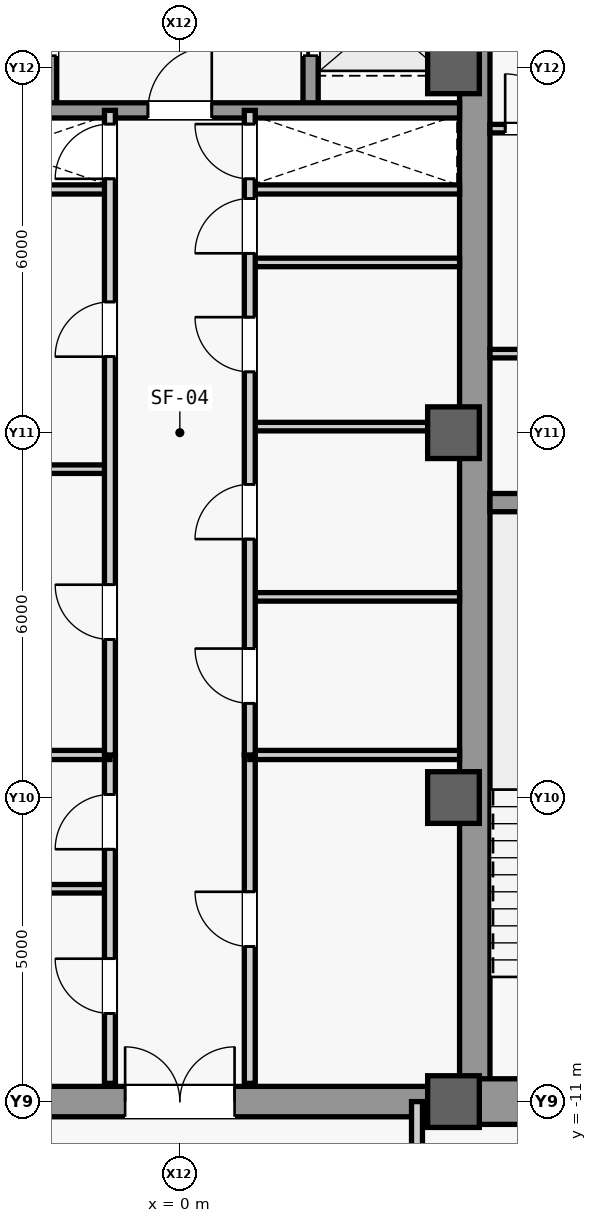
"""IFC4 building model, lengths in metres.
Left out: names, types, materials, properties, quantities, classifications, styles, units other than length and angle.
Written with IfcOpenShell. Run it as: python <this file> out.ifc"""

import sys

from ifc_helpers import new_model, si_unit, direction, frame, frame_2d, origin, origin_2d, place, context, subcontext, project, spatial, rectangle, extrude, source, transform, mapped, element, fill, save


model = new_model("IFC4")
c1 = context("Model", 3, precision=1e-05, world=origin(), true_north=direction((0.0, 1.0)))
c2 = subcontext(c1, "Body", "Model", "MODEL_VIEW")
j1 = project(units=[si_unit("LENGTHUNIT", "METRE"), si_unit("PLANEANGLEUNIT", "RADIAN")], contexts=[c1])
p1 = place(None, origin())
s1 = spatial("IfcSite", under=j1, at=p1, CompositionType="ELEMENT")
p2 = place(p1, origin())
s2 = spatial("IfcBuilding", under=s1, at=p2, CompositionType="ELEMENT")
p3 = place(p2, frame((0.0, 0.0, 203.1)))
s3 = spatial("IfcBuildingStorey", under=s2, at=p3, CompositionType="ELEMENT", Elevation=203.1)
m1 = source(origin(), c2, "Body", "SweptSolid", [
    extrude(rectangle(XDim=21.4, YDim=0.5, at=frame_2d((10.7, 0.0))), origin(), (0.0, 0.0, 1.0), 3.78),
])
p4 = place(p3, frame((4.85, -10.7, 0.0), z_axis=(0.0, 0.0, 1.0), x_axis=(0.0, 1.0, 0.0)))
e1 = element("IfcWall", 1, at=p4, inside=s3, PredefinedType="SHEAR", context=c2, shape_type="MappedRepresentation", body=[
    mapped(m1, transform((0.0, 0.0, 0.0), scale=1.0)),
])
m2 = source(origin(), c2, "Body", "SweptSolid", [
    extrude(rectangle(XDim=5.85, YDim=0.75, at=frame_2d((2.925, 0.0))), origin(), (0.0, 0.0, 1.0), 3.78),
])
p5 = place(p3, frame((4.85, -11.0, 0.0), z_axis=(0.0, 0.0, 1.0), x_axis=(1.0, 0.0, 0.0)))
e2 = element("IfcWall", 2, at=p5, inside=s3, PredefinedType="SHEAR", context=c2, shape_type="MappedRepresentation", body=[
    mapped(m2, transform((0.0, 0.0, 0.0), scale=1.0)),
])
m3 = source(origin(), c2, "Body", "SweptSolid", [
    extrude(rectangle(XDim=5.6, YDim=0.3, at=frame_2d((2.8, 0.0))), origin(), (0.0, 0.0, 1.0), 3.78),
])
p6 = place(p3, frame((5.1, -1.15, 0.0), z_axis=(0.0, 0.0, 1.0), x_axis=(1.0, 0.0, 0.0)))
e3 = element("IfcWall", 3, at=p6, inside=s3, PredefinedType="SHEAR", context=c2, shape_type="MappedRepresentation", body=[
    mapped(m3, transform((0.0, 0.0, 0.0), scale=1.0)),
])
m4 = source(origin(), c2, "Body", "SweptSolid", [
    extrude(rectangle(XDim=9.2, YDim=0.5, at=frame_2d((4.6, 0.0))), origin(), (0.0, 0.0, 1.0), 3.78),
])
p7 = place(p3, frame((-4.6, -11.0, 0.0), z_axis=(0.0, 0.0, 1.0), x_axis=(1.0, 0.0, 0.0)))
e4 = element("IfcWall", 4, at=p7, inside=s3, PredefinedType="SHEAR", context=c2, shape_type="MappedRepresentation", body=[
    mapped(m4, transform((0.0, 0.0, 0.0), scale=1.0)),
])
m5 = source(origin(), c2, "Body", "SweptSolid", [
    extrude(rectangle(XDim=1.8, YDim=2.25, at=frame_2d((0.9, 1.125))), frame((0.0, 0.26, 0.0), z_axis=(0.0, -1.0, 0.0), x_axis=(1.0, 0.0, 0.0)), (0.0, 0.0, 1.0), 0.52),
])
p8 = place(p7, frame((3.7, 0.0, 0.0)))
e5 = element("IfcOpeningElement", 5, at=p8, cuts=e4, PredefinedType="OPENING", context=c2, shape_type="MappedRepresentation", body=[
    mapped(m5, transform((0.0, 0.0, 0.0), scale=1.0)),
])
m6 = source(origin(), c2, "Body", "SweptSolid", [
    extrude(rectangle(XDim=0.85, YDim=0.85, at=origin_2d()), origin(), (0.0, 0.0, 1.0), 4.0),
])
for number, where, z_axis, x_axis in (
    (6, (4.5, -11.0, 0.0), (0.0, 0.0, 1.0), (1.0, 0.0, 0.0)),
    (7, (4.5, -6.0, 0.0), (0.0, 0.0, 1.0), (1.0, 0.0, 0.0)),
    (8, (4.5, 0.0, 0.0), (0.0, 0.0, 1.0), (1.0, 0.0, 0.0)),
    (9, (4.5, 6.0, 0.0), (0.0, 0.0, 1.0), (1.0, 0.0, 0.0)),
):
    element("IfcColumn", number, at=place(p3, frame(where, z_axis=z_axis, x_axis=x_axis)), inside=s3, PredefinedType="COLUMN", context=c2, shape_type="MappedRepresentation", body=[
        mapped(m6, transform((0.0, 0.0, 0.0), scale=1.0)),
    ])
m7 = source(origin(), c2, "Body", "SweptSolid", [
    extrude(rectangle(XDim=3.15, YDim=0.14, at=frame_2d((1.575, 0.0))), origin(), (0.0, 0.0, 1.0), 3.78),
])
p9 = place(p3, frame((5.1, 1.3, 0.0), z_axis=(0.0, 0.0, 1.0), x_axis=(1.0, 0.0, 0.0)))
e10 = element("IfcWall", 10, at=p9, inside=s3, PredefinedType="PARTITIONING", context=c2, shape_type="MappedRepresentation", body=[
    mapped(m7, transform((0.0, 0.0, 0.0), scale=1.0)),
])
p10 = place(p3, frame((5.1, 5.0, 0.0), z_axis=(0.0, 0.0, 1.0), x_axis=(1.0, 0.0, 0.0)))
e11 = element("IfcWall", 11, at=p10, inside=s3, PredefinedType="PARTITIONING", context=c2, shape_type="MappedRepresentation", body=[
    mapped(m7, transform((0.0, 0.0, 0.0), scale=1.0)),
])
m8 = source(origin(), c2, "Body", "SweptSolid", [
    extrude(rectangle(XDim=0.9, YDim=2.15, at=frame_2d((0.45, 1.075))), frame((0.0, 0.08, 0.0), z_axis=(0.0, -1.0, 0.0), x_axis=(1.0, 0.0, 0.0)), (0.0, 0.0, 1.0), 0.16),
])
p11 = place(p10, frame((0.25, 0.0, 0.0)))
e12 = element("IfcOpeningElement", 12, at=p11, cuts=e11, PredefinedType="OPENING", context=c2, shape_type="MappedRepresentation", body=[
    mapped(m8, transform((0.0, 0.0, 0.0), scale=1.0)),
])
m9 = source(origin(), c2, "Body", "SweptSolid", [
    extrude(rectangle(XDim=3.45, YDim=0.15, at=frame_2d((1.725, 0.0))), origin(), (0.0, 0.0, 1.0), 3.78),
])
for number, where, z_axis, x_axis in (
    (13, (-4.6, 4.0, 0.0), (0.0, 0.0, 1.0), (1.0, 0.0, 0.0)),
    (14, (1.15, 4.0, 0.0), (0.0, 0.0, 1.0), (1.0, 0.0, 0.0)),
):
    element("IfcWall", number, at=place(p3, frame(where, z_axis=z_axis, x_axis=x_axis)), inside=s3, PredefinedType="PARTITIONING", context=c2, shape_type="MappedRepresentation", body=[
        mapped(m9, transform((0.0, 0.0, 0.0), scale=1.0)),
    ])
m10 = source(origin(), c2, "Body", "SweptSolid", [
    extrude(rectangle(XDim=3.45, YDim=0.14, at=frame_2d((1.725, 0.0))), origin(), (0.0, 0.0, 1.0), 3.78),
])
p12 = place(p3, frame((-4.6, -7.5, 0.0), z_axis=(0.0, 0.0, 1.0), x_axis=(1.0, 0.0, 0.0)))
e15 = element("IfcWall", 15, at=p12, inside=s3, PredefinedType="PARTITIONING", context=c2, shape_type="MappedRepresentation", body=[
    mapped(m10, transform((0.0, 0.0, 0.0), scale=1.0)),
])
m11 = source(origin(), c2, "Body", "SweptSolid", [
    extrude(rectangle(XDim=5.4, YDim=0.18, at=frame_2d((2.7, 0.0))), origin(), (0.0, 0.0, 1.0), 3.78),
])
p13 = place(p3, frame((-1.15, -10.7, 0.0), z_axis=(0.0, 0.0, 1.0), x_axis=(0.0, 1.0, 0.0)))
e16 = element("IfcWall", 16, at=p13, inside=s3, PredefinedType="PARTITIONING", context=c2, shape_type="MappedRepresentation", body=[
    mapped(m11, transform((0.0, 0.0, 0.0), scale=1.0)),
])
m12 = source(origin(), c2, "Body", "SweptSolid", [
    extrude(rectangle(XDim=0.9, YDim=2.15, at=frame_2d((0.45, 1.075))), frame((0.0, 0.1, 0.0), z_axis=(0.0, -1.0, 0.0), x_axis=(1.0, 0.0, 0.0)), (0.0, 0.0, 1.0), 0.2),
])
p14 = place(p13, frame((1.15, 0.0, 0.0)))
e17 = element("IfcOpeningElement", 17, at=p14, cuts=e16, PredefinedType="OPENING", context=c2, shape_type="MappedRepresentation", body=[
    mapped(m12, transform((0.0, 0.0, 0.0), scale=1.0)),
])
p15 = place(p13, frame((3.85, 0.0, 0.0)))
e18 = element("IfcOpeningElement", 18, at=p15, cuts=e16, PredefinedType="OPENING", context=c2, shape_type="MappedRepresentation", body=[
    mapped(m12, transform((0.0, 0.0, 0.0), scale=1.0)),
])
p16 = place(p3, frame((1.15, -10.7, 0.0), z_axis=(0.0, 0.0, 1.0), x_axis=(0.0, 1.0, 0.0)))
e19 = element("IfcWall", 19, at=p16, inside=s3, PredefinedType="PARTITIONING", context=c2, shape_type="MappedRepresentation", body=[
    mapped(m11, transform((0.0, 0.0, 0.0), scale=1.0)),
])
p17 = place(p16, frame((2.25, 0.0, 0.0)))
e20 = element("IfcOpeningElement", 20, at=p17, cuts=e19, PredefinedType="OPENING", context=c2, shape_type="MappedRepresentation", body=[
    mapped(m12, transform((0.0, 0.0, 0.0), scale=1.0)),
])
for number, where, z_axis, x_axis in (
    (21, (-4.6, -5.3, 0.0), (0.0, 0.0, 1.0), (1.0, 0.0, 0.0)),
    (22, (1.15, -5.3, 0.0), (0.0, 0.0, 1.0), (1.0, 0.0, 0.0)),
):
    element("IfcWall", number, at=place(p3, frame(where, z_axis=z_axis, x_axis=x_axis)), inside=s3, PredefinedType="PARTITIONING", context=c2, shape_type="MappedRepresentation", body=[
        mapped(m9, transform((0.0, 0.0, 0.0), scale=1.0)),
    ])
m13 = source(origin(), c2, "Body", "SweptSolid", [
    extrude(rectangle(XDim=5.4, YDim=0.25, at=frame_2d((2.7, 0.0))), origin(), (0.0, 0.0, 1.0), 3.78),
])
p18 = place(p3, frame((-2.15, 5.3, 0.0), z_axis=(0.0, 0.0, 1.0), x_axis=(0.0, 1.0, 0.0)))
e23 = element("IfcWall", 23, at=p18, inside=s3, PredefinedType="SHEAR", context=c2, shape_type="MappedRepresentation", body=[
    mapped(m13, transform((0.0, 0.0, 0.0), scale=1.0)),
])
m14 = source(origin(), c2, "Body", "SweptSolid", [
    extrude(rectangle(XDim=1.2, YDim=2.3, at=frame_2d((0.6, 1.15))), frame((0.0, 0.135, 0.0), z_axis=(0.0, -1.0, 0.0), x_axis=(1.0, 0.0, 0.0)), (0.0, 0.0, 1.0), 0.27),
])
p19 = place(p18, frame((3.3, 0.0, 0.0)))
e24 = element("IfcOpeningElement", 24, at=p19, cuts=e23, PredefinedType="OPENING", context=c2, shape_type="MappedRepresentation", body=[
    mapped(m14, transform((0.0, 0.0, 0.0), scale=1.0)),
])
p20 = place(p18, frame((0.9, 0.0, 0.0)))
e25 = element("IfcOpeningElement", 25, at=p20, cuts=e23, PredefinedType="OPENING", context=c2, shape_type="MappedRepresentation", body=[
    mapped(m14, transform((0.0, 0.0, 0.0), scale=1.0)),
])
p21 = place(p3, frame((2.15, 5.3, 0.0), z_axis=(0.0, 0.0, 1.0), x_axis=(0.0, 1.0, 0.0)))
e26 = element("IfcWall", 26, at=p21, inside=s3, PredefinedType="SHEAR", context=c2, shape_type="MappedRepresentation", body=[
    mapped(m13, transform((0.0, 0.0, 0.0), scale=1.0)),
])
p22 = place(p21, frame((3.3, 0.0, 0.0)))
e27 = element("IfcOpeningElement", 27, at=p22, cuts=e26, PredefinedType="OPENING", context=c2, shape_type="MappedRepresentation", body=[
    mapped(m14, transform((0.0, 0.0, 0.0), scale=1.0)),
])
p23 = place(p21, frame((0.9, 0.0, 0.0)))
e28 = element("IfcOpeningElement", 28, at=p23, cuts=e26, PredefinedType="OPENING", context=c2, shape_type="MappedRepresentation", body=[
    mapped(m14, transform((0.0, 0.0, 0.0), scale=1.0)),
])
m15 = source(origin(), c2, "Body", "SweptSolid", [
    extrude(rectangle(XDim=9.2, YDim=0.25, at=frame_2d((4.6, 0.0))), origin(), (0.0, 0.0, 1.0), 3.78),
])
p24 = place(p3, frame((-4.6, 5.3, 0.0), z_axis=(0.0, 0.0, 1.0), x_axis=(1.0, 0.0, 0.0)))
e29 = element("IfcWall", 29, at=p24, inside=s3, PredefinedType="SHEAR", context=c2, shape_type="MappedRepresentation", body=[
    mapped(m15, transform((0.0, 0.0, 0.0), scale=1.0)),
])
m16 = source(origin(), c2, "Body", "SweptSolid", [
    extrude(rectangle(XDim=1.05, YDim=2.2, at=frame_2d((0.525, 1.1))), frame((0.0, 0.135, 0.0), z_axis=(0.0, -1.0, 0.0), x_axis=(1.0, 0.0, 0.0)), (0.0, 0.0, 1.0), 0.27),
])
p25 = place(p24, frame((4.075, 0.0, 0.0)))
e30 = element("IfcOpeningElement", 30, at=p25, cuts=e29, PredefinedType="OPENING", context=c2, shape_type="MappedRepresentation", body=[
    mapped(m16, transform((0.0, 0.0, 0.0), scale=1.0)),
])
p26 = place(p3, frame((-4.6, -0.6, 0.0), z_axis=(0.0, 0.0, 1.0), x_axis=(1.0, 0.0, 0.0)))
e31 = element("IfcWall", 31, at=p26, inside=s3, PredefinedType="PARTITIONING", context=c2, shape_type="MappedRepresentation", body=[
    mapped(m10, transform((0.0, 0.0, 0.0), scale=1.0)),
])
m17 = source(origin(), c2, "Body", "SweptSolid", [
    extrude(rectangle(XDim=10.6, YDim=0.18, at=frame_2d((5.3, 0.0))), origin(), (0.0, 0.0, 1.0), 3.78),
])
p27 = place(p3, frame((-1.15, -5.3, 0.0), z_axis=(0.0, 0.0, 1.0), x_axis=(0.0, 1.0, 0.0)))
e32 = element("IfcWall", 32, at=p27, inside=s3, PredefinedType="PARTITIONING", context=c2, shape_type="MappedRepresentation", body=[
    mapped(m17, transform((0.0, 0.0, 0.0), scale=1.0)),
])
p28 = place(p27, frame((1.9, 0.0, 0.0)))
e33 = element("IfcOpeningElement", 33, at=p28, cuts=e32, PredefinedType="OPENING", context=c2, shape_type="MappedRepresentation", body=[
    mapped(m12, transform((0.0, 0.0, 0.0), scale=1.0)),
])
p29 = place(p27, frame((6.55, 0.0, 0.0)))
e34 = element("IfcOpeningElement", 34, at=p29, cuts=e32, PredefinedType="OPENING", context=c2, shape_type="MappedRepresentation", body=[
    mapped(m12, transform((0.0, 0.0, 0.0), scale=1.0)),
])
p30 = place(p27, frame((9.475, 0.0, 0.0)))
e35 = element("IfcOpeningElement", 35, at=p30, cuts=e32, PredefinedType="OPENING", context=c2, shape_type="MappedRepresentation", body=[
    mapped(m12, transform((0.0, 0.0, 0.0), scale=1.0)),
])
p31 = place(p3, frame((1.15, -2.7, 0.0), z_axis=(0.0, 0.0, 1.0), x_axis=(1.0, 0.0, 0.0)))
e36 = element("IfcWall", 36, at=p31, inside=s3, PredefinedType="PARTITIONING", context=c2, shape_type="MappedRepresentation", body=[
    mapped(m10, transform((0.0, 0.0, 0.0), scale=1.0)),
])
m18 = source(origin(), c2, "Body", "SweptSolid", [
    extrude(rectangle(XDim=3.45, YDim=0.14, at=frame_2d((1.725, 0.0))), origin(), (0.0, 0.0, 1.0), 3.085),
])
p32 = place(p3, frame((1.15, 0.1, 0.0), z_axis=(0.0, 0.0, 1.0), x_axis=(1.0, 0.0, 0.0)))
e37 = element("IfcWall", 37, at=p32, inside=s3, PredefinedType="PARTITIONING", context=c2, shape_type="MappedRepresentation", body=[
    mapped(m18, transform((0.0, 0.0, 0.0), scale=1.0)),
])
p33 = place(p3, frame((1.15, 2.8, 0.0), z_axis=(0.0, 0.0, 1.0), x_axis=(1.0, 0.0, 0.0)))
e38 = element("IfcWall", 38, at=p33, inside=s3, PredefinedType="PARTITIONING", context=c2, shape_type="MappedRepresentation", body=[
    mapped(m10, transform((0.0, 0.0, 0.0), scale=1.0)),
])
p34 = place(p3, frame((1.15, -5.3, 0.0), z_axis=(0.0, 0.0, 1.0), x_axis=(0.0, 1.0, 0.0)))
e39 = element("IfcWall", 39, at=p34, inside=s3, PredefinedType="PARTITIONING", context=c2, shape_type="MappedRepresentation", body=[
    mapped(m17, transform((0.0, 0.0, 0.0), scale=1.0)),
])
p35 = place(p34, frame((0.85, 0.0, 0.0)))
e40 = element("IfcOpeningElement", 40, at=p35, cuts=e39, PredefinedType="OPENING", context=c2, shape_type="MappedRepresentation", body=[
    mapped(m12, transform((0.0, 0.0, 0.0), scale=1.0)),
])
p36 = place(p34, frame((3.55, 0.0, 0.0)))
e41 = element("IfcOpeningElement", 41, at=p36, cuts=e39, PredefinedType="OPENING", context=c2, shape_type="MappedRepresentation", body=[
    mapped(m12, transform((0.0, 0.0, 0.0), scale=1.0)),
])
p37 = place(p34, frame((6.3, 0.0, 0.0)))
e42 = element("IfcOpeningElement", 42, at=p37, cuts=e39, PredefinedType="OPENING", context=c2, shape_type="MappedRepresentation", body=[
    mapped(m12, transform((0.0, 0.0, 0.0), scale=1.0)),
])
p38 = place(p34, frame((8.25, 0.0, 0.0)))
e43 = element("IfcOpeningElement", 43, at=p38, cuts=e39, PredefinedType="OPENING", context=c2, shape_type="MappedRepresentation", body=[
    mapped(m12, transform((0.0, 0.0, 0.0), scale=1.0)),
])
p39 = place(p34, frame((9.475, 0.0, 0.0)))
e44 = element("IfcOpeningElement", 44, at=p39, cuts=e39, PredefinedType="OPENING", context=c2, shape_type="MappedRepresentation", body=[
    mapped(m12, transform((0.0, 0.0, 0.0), scale=1.0)),
])
m19 = source(origin(), c2, "Body", "SweptSolid", [
    extrude(rectangle(XDim=2.6, YDim=0.18, at=frame_2d((1.3, 0.0))), origin(), (0.0, 0.0, 1.0), 3.78),
])
p40 = place(p3, frame((3.9, -13.6, 0.0), z_axis=(0.0, 0.0, 1.0), x_axis=(0.0, 1.0, 0.0)))
e45 = element("IfcWall", 45, at=p40, inside=s3, PredefinedType="PARTITIONING", context=c2, shape_type="MappedRepresentation", body=[
    mapped(m19, transform((0.0, 0.0, 0.0), scale=1.0)),
])
m20 = source(origin(), c2, "Body", "SweptSolid", [
    extrude(rectangle(XDim=0.9, YDim=2.15, at=frame_2d((0.45, 1.075))), frame((0.0, 0.025, 0.0), z_axis=(0.0, -1.0, 0.0), x_axis=(1.0, 0.0, 0.0)), (0.0, 0.0, 1.0), 0.05),
])
p41 = place(p11, origin())
e46 = element("IfcDoor", 46, at=p41, inside=s3, OperationType="SINGLE_SWING_LEFT", PredefinedType="DOOR", context=c2, shape_type="MappedRepresentation", body=[
    mapped(m20, transform((0.0, 0.0, 0.0), scale=1.0)),
])
fill(e12, e46)
p42 = place(p14, origin())
e47 = element("IfcDoor", 47, at=p42, inside=s3, OperationType="SINGLE_SWING_RIGHT", PredefinedType="DOOR", context=c2, shape_type="MappedRepresentation", body=[
    mapped(m20, transform((0.0, 0.0, 0.0), scale=1.0)),
])
fill(e17, e47)
p43 = place(p15, origin())
e48 = element("IfcDoor", 48, at=p43, inside=s3, OperationType="SINGLE_SWING_LEFT", PredefinedType="DOOR", context=c2, shape_type="MappedRepresentation", body=[
    mapped(m20, transform((0.0, 0.0, 0.0), scale=1.0)),
])
fill(e18, e48)
p44 = place(p17, origin())
e49 = element("IfcDoor", 49, at=p44, inside=s3, OperationType="SINGLE_SWING_RIGHT", PredefinedType="DOOR", context=c2, shape_type="MappedRepresentation", body=[
    mapped(m20, transform((0.0, 0.0, 0.0), scale=1.0)),
])
fill(e20, e49)
m21 = source(origin(), c2, "Body", "SweptSolid", [
    extrude(rectangle(XDim=1.8, YDim=2.25, at=frame_2d((0.9, 1.125))), frame((0.0, 0.025, 0.0), z_axis=(0.0, -1.0, 0.0), x_axis=(1.0, 0.0, 0.0)), (0.0, 0.0, 1.0), 0.05),
])
p45 = place(p8, origin())
e50 = element("IfcDoor", 50, at=p45, inside=s3, OperationType="SINGLE_SWING_LEFT", PredefinedType="DOOR", context=c2, shape_type="MappedRepresentation", body=[
    mapped(m21, transform((0.0, 0.0, 0.0), scale=1.0)),
])
fill(e5, e50)
m22 = source(origin(), c2, "Body", "SweptSolid", [
    extrude(rectangle(XDim=1.05, YDim=2.2, at=frame_2d((0.525, 1.1))), frame((0.0, 0.025, 0.0), z_axis=(0.0, -1.0, 0.0), x_axis=(1.0, 0.0, 0.0)), (0.0, 0.0, 1.0), 0.05),
])
p46 = place(p25, origin())
e51 = element("IfcDoor", 51, at=p46, inside=s3, OperationType="SINGLE_SWING_RIGHT", PredefinedType="DOOR", context=c2, shape_type="MappedRepresentation", body=[
    mapped(m22, transform((0.0, 0.0, 0.0), scale=1.0)),
])
fill(e30, e51)
p47 = place(p28, origin())
e52 = element("IfcDoor", 52, at=p47, inside=s3, OperationType="SINGLE_SWING_RIGHT", PredefinedType="DOOR", context=c2, shape_type="MappedRepresentation", body=[
    mapped(m20, transform((0.0, 0.0, 0.0), scale=1.0)),
])
fill(e33, e52)
p48 = place(p29, origin())
e53 = element("IfcDoor", 53, at=p48, inside=s3, OperationType="SINGLE_SWING_LEFT", PredefinedType="DOOR", context=c2, shape_type="MappedRepresentation", body=[
    mapped(m20, transform((0.0, 0.0, 0.0), scale=1.0)),
])
fill(e34, e53)
p49 = place(p35, origin())
e54 = element("IfcDoor", 54, at=p49, inside=s3, OperationType="SINGLE_SWING_RIGHT", PredefinedType="DOOR", context=c2, shape_type="MappedRepresentation", body=[
    mapped(m20, transform((0.0, 0.0, 0.0), scale=1.0)),
])
fill(e40, e54)
p50 = place(p36, origin())
e55 = element("IfcDoor", 55, at=p50, inside=s3, OperationType="SINGLE_SWING_LEFT", PredefinedType="DOOR", context=c2, shape_type="MappedRepresentation", body=[
    mapped(m20, transform((0.0, 0.0, 0.0), scale=1.0)),
])
fill(e41, e55)
p51 = place(p37, origin())
e56 = element("IfcDoor", 56, at=p51, inside=s3, OperationType="SINGLE_SWING_RIGHT", PredefinedType="DOOR", context=c2, shape_type="MappedRepresentation", body=[
    mapped(m20, transform((0.0, 0.0, 0.0), scale=1.0)),
])
fill(e42, e56)
p52 = place(p38, origin())
e57 = element("IfcDoor", 57, at=p52, inside=s3, OperationType="SINGLE_SWING_LEFT", PredefinedType="DOOR", context=c2, shape_type="MappedRepresentation", body=[
    mapped(m20, transform((0.0, 0.0, 0.0), scale=1.0)),
])
fill(e43, e57)
p53 = place(p30, origin())
e58 = element("IfcDoor", 58, at=p53, inside=s3, OperationType="SINGLE_SWING_LEFT", PredefinedType="DOOR", context=c2, shape_type="MappedRepresentation", body=[
    mapped(m20, transform((0.0, 0.0, 0.0), scale=1.0)),
])
fill(e35, e58)
p54 = place(p39, origin())
e59 = element("IfcDoor", 59, at=p54, inside=s3, OperationType="SINGLE_SWING_RIGHT", PredefinedType="DOOR", context=c2, shape_type="MappedRepresentation", body=[
    mapped(m20, transform((0.0, 0.0, 0.0), scale=1.0)),
])
fill(e44, e59)
m23 = source(origin(), c2, "Body", "SweptSolid", [
    extrude(rectangle(XDim=1.2, YDim=2.3, at=frame_2d((0.6, 1.15))), frame((0.0, 0.025, 0.0), z_axis=(0.0, -1.0, 0.0), x_axis=(1.0, 0.0, 0.0)), (0.0, 0.0, 1.0), 0.05),
])
p55 = place(p23, origin())
e60 = element("IfcDoor", 60, at=p55, inside=s3, OperationType="SLIDING_TO_LEFT", PredefinedType="DOOR", context=c2, shape_type="MappedRepresentation", body=[
    mapped(m23, transform((0.0, 0.0, 0.0), scale=1.0)),
])
fill(e28, e60)
save(model, sys.argv[1])
